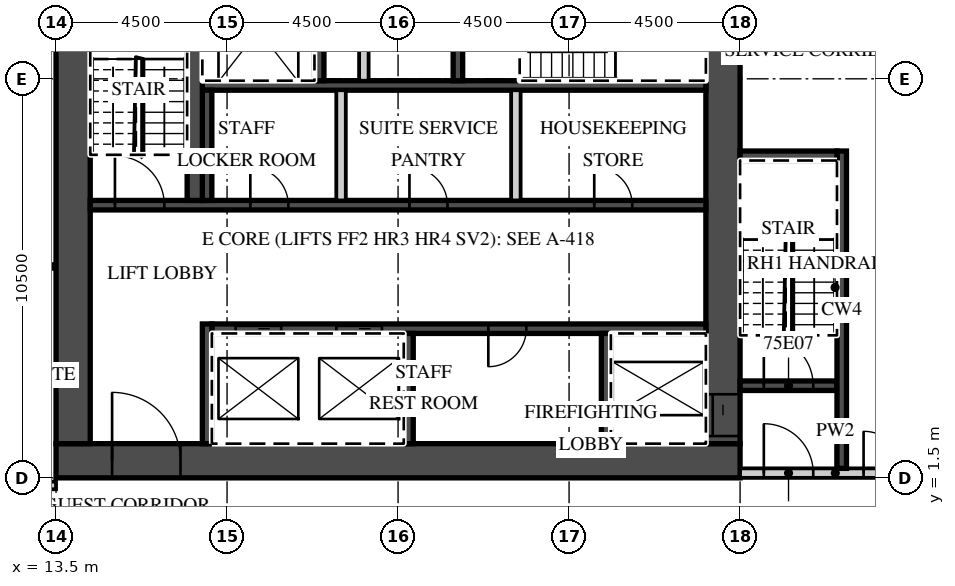
"""IFC4 building model, lengths in metres.
Left out: names, types, materials, properties, quantities, classifications, styles, units other than length and angle.
Written with IfcOpenShell. Run it as: python <this file> out.ifc"""

import sys

from ifc_helpers import new_model, si_unit, direction, frame, frame_2d, origin, place, context, subcontext, project, spatial, rectangle, extrude, element, fill, save


model = new_model("IFC4")
c1 = context("Model", 3, precision=1e-05, world=origin(), true_north=direction((0.0, 1.0)))
c2 = subcontext(c1, "Body", "Model", "MODEL_VIEW")
j1 = project(units=[si_unit("LENGTHUNIT", "METRE"), si_unit("PLANEANGLEUNIT", "RADIAN")], contexts=[c1])
p1 = place(None, origin())
s1 = spatial("IfcSite", under=j1, at=p1, CompositionType="ELEMENT")
p2 = place(p1, origin())
s2 = spatial("IfcBuilding", under=s1, at=p2, CompositionType="ELEMENT")
p3 = place(p2, frame((0.0, 0.0, 298.2)))
s3 = spatial("IfcBuildingStorey", under=s2, at=p3, CompositionType="ELEMENT", Elevation=298.2)
p4 = place(p3, frame((38.132, -12.858, 0.0), z_axis=(0.0, 0.0, 1.0), x_axis=(-0.095847749461, 0.995396006082, 0.0)))
e1 = element("IfcWall", 1, at=p4, inside=s3, PredefinedType="SOLIDWALL", context=c2, shape_type="SweptSolid", body=[
    extrude(rectangle(XDim=32.0, YDim=0.45, at=frame_2d((16.0, 0.0))), origin(), (0.0, 0.0, 1.0), 3.02),
])
p5 = place(p3, frame((-39.909, 1.3, 0.0), z_axis=(0.0, 0.0, 1.0), x_axis=(1.0, 0.0, 0.0)))
e2 = element("IfcWall", 2, at=p5, inside=s3, PredefinedType="PARTITIONING", context=c2, shape_type="SweptSolid", body=[
    extrude(rectangle(XDim=53.409, YDim=0.2, at=frame_2d((26.705, 0.0))), origin(), (0.0, 0.0, 1.0), 3.02),
])
p6 = place(p5, frame((0.255, 0.0, 0.0)))
e3 = element("IfcOpeningElement", 3, at=p6, cuts=e2, PredefinedType="OPENING", context=c2, shape_type="SweptSolid", body=[
    extrude(rectangle(XDim=0.9, YDim=2.1, at=frame_2d((0.45, 1.05))), frame((0.0, 0.11, 0.0), z_axis=(0.0, -1.0, 0.0), x_axis=(1.0, 0.0, 0.0)), (0.0, 0.0, 1.0), 0.22),
])
p7 = place(p5, frame((4.484, 0.0, 0.0)))
e4 = element("IfcOpeningElement", 4, at=p7, cuts=e2, PredefinedType="OPENING", context=c2, shape_type="SweptSolid", body=[
    extrude(rectangle(XDim=1.0, YDim=2.1, at=frame_2d((0.5, 1.05))), frame((0.0, 0.11, 0.0), z_axis=(0.0, -1.0, 0.0), x_axis=(1.0, 0.0, 0.0)), (0.0, 0.0, 1.0), 0.22),
])
p8 = place(p5, frame((11.334, 0.0, 0.0)))
e5 = element("IfcOpeningElement", 5, at=p8, cuts=e2, PredefinedType="OPENING", context=c2, shape_type="SweptSolid", body=[
    extrude(rectangle(XDim=1.0, YDim=2.1, at=frame_2d((0.5, 1.05))), frame((0.0, 0.11, 0.0), z_axis=(0.0, -1.0, 0.0), x_axis=(1.0, 0.0, 0.0)), (0.0, 0.0, 1.0), 0.22),
])
p9 = place(p5, frame((15.347, 0.0, 0.0)))
e6 = element("IfcOpeningElement", 6, at=p9, cuts=e2, PredefinedType="OPENING", context=c2, shape_type="SweptSolid", body=[
    extrude(rectangle(XDim=1.2, YDim=2.1, at=frame_2d((0.6, 1.05))), frame((0.0, 0.11, 0.0), z_axis=(0.0, -1.0, 0.0), x_axis=(1.0, 0.0, 0.0)), (0.0, 0.0, 1.0), 0.22),
])
p10 = place(p5, frame((24.859, 0.0, 0.0)))
e7 = element("IfcOpeningElement", 7, at=p10, cuts=e2, PredefinedType="OPENING", context=c2, shape_type="SweptSolid", body=[
    extrude(rectangle(XDim=1.0, YDim=2.1, at=frame_2d((0.5, 1.05))), frame((0.0, 0.11, 0.0), z_axis=(0.0, -1.0, 0.0), x_axis=(1.0, 0.0, 0.0)), (0.0, 0.0, 1.0), 0.22),
])
p11 = place(p5, frame((26.959, 0.0, 0.0)))
e8 = element("IfcOpeningElement", 8, at=p11, cuts=e2, PredefinedType="OPENING", context=c2, shape_type="SweptSolid", body=[
    extrude(rectangle(XDim=1.0, YDim=2.1, at=frame_2d((0.5, 1.05))), frame((0.0, 0.11, 0.0), z_axis=(0.0, -1.0, 0.0), x_axis=(1.0, 0.0, 0.0)), (0.0, 0.0, 1.0), 0.22),
])
p12 = place(p5, frame((33.346, 0.0, 0.0)))
e9 = element("IfcOpeningElement", 9, at=p12, cuts=e2, PredefinedType="OPENING", context=c2, shape_type="SweptSolid", body=[
    extrude(rectangle(XDim=1.2, YDim=2.1, at=frame_2d((0.6, 1.05))), frame((0.0, 0.11, 0.0), z_axis=(0.0, -1.0, 0.0), x_axis=(1.0, 0.0, 0.0)), (0.0, 0.0, 1.0), 0.22),
])
p13 = place(p5, frame((42.859, 0.0, 0.0)))
e10 = element("IfcOpeningElement", 10, at=p13, cuts=e2, PredefinedType="OPENING", context=c2, shape_type="SweptSolid", body=[
    extrude(rectangle(XDim=1.0, YDim=2.1, at=frame_2d((0.5, 1.05))), frame((0.0, 0.11, 0.0), z_axis=(0.0, -1.0, 0.0), x_axis=(1.0, 0.0, 0.0)), (0.0, 0.0, 1.0), 0.22),
])
p14 = place(p5, frame((44.959, 0.0, 0.0)))
e11 = element("IfcOpeningElement", 11, at=p14, cuts=e2, PredefinedType="OPENING", context=c2, shape_type="SweptSolid", body=[
    extrude(rectangle(XDim=1.0, YDim=2.1, at=frame_2d((0.5, 1.05))), frame((0.0, 0.11, 0.0), z_axis=(0.0, -1.0, 0.0), x_axis=(1.0, 0.0, 0.0)), (0.0, 0.0, 1.0), 0.22),
])
p15 = place(p5, frame((49.484, 0.0, 0.0)))
e12 = element("IfcOpeningElement", 12, at=p15, cuts=e2, PredefinedType="OPENING", context=c2, shape_type="SweptSolid", body=[
    extrude(rectangle(XDim=1.0, YDim=2.1, at=frame_2d((0.5, 1.05))), frame((0.0, 0.11, 0.0), z_axis=(0.0, -1.0, 0.0), x_axis=(1.0, 0.0, 0.0)), (0.0, 0.0, 1.0), 0.22),
])
p16 = place(p3, frame((13.5, 1.95, 0.0), z_axis=(0.0, 0.0, 1.0), x_axis=(1.0, 0.0, 0.0)))
e13 = element("IfcWall", 13, at=p16, inside=s3, PredefinedType="SHEAR", context=c2, shape_type="SweptSolid", body=[
    extrude(rectangle(XDim=18.0, YDim=0.9, at=frame_2d((9.0, 0.0))), origin(), (0.0, 0.0, 1.0), 3.02),
])
p17 = place(p16, frame((1.475, 0.0, 0.0)))
e14 = element("IfcOpeningElement", 14, at=p17, cuts=e13, PredefinedType="OPENING", context=c2, shape_type="SweptSolid", body=[
    extrude(rectangle(XDim=1.8, YDim=2.1, at=frame_2d((0.9, 1.05))), frame((0.0, 0.46, 0.0), z_axis=(0.0, -1.0, 0.0), x_axis=(1.0, 0.0, 0.0)), (0.0, 0.0, 1.0), 0.92),
])
p18 = place(p3, frame((31.05, 2.4, 0.0), z_axis=(0.0, 0.0, 1.0), x_axis=(0.0, 1.0, 0.0)))
e15 = element("IfcWall", 15, at=p18, inside=s3, PredefinedType="SHEAR", context=c2, shape_type="SweptSolid", body=[
    extrude(rectangle(XDim=12.8, YDim=0.9, at=frame_2d((6.4, 0.0))), origin(), (0.0, 0.0, 1.0), 3.02),
])
p19 = place(p18, frame((0.2, 0.0, 0.0)))
e16 = element("IfcOpeningElement", 16, at=p19, cuts=e15, PredefinedType="OPENING", context=c2, shape_type="SweptSolid", body=[
    extrude(rectangle(XDim=1.1, YDim=2.1, at=frame_2d((0.55, 1.05))), frame((0.0, 0.46, 0.0), z_axis=(0.0, -1.0, 0.0), x_axis=(1.0, 0.0, 0.0)), (0.0, 0.0, 1.0), 0.92),
])
p20 = place(p3, frame((13.95, 2.4, 0.0), z_axis=(0.0, 0.0, 1.0), x_axis=(0.0, 1.0, 0.0)))
e17 = element("IfcWall", 17, at=p20, inside=s3, PredefinedType="SHEAR", context=c2, shape_type="SweptSolid", body=[
    extrude(rectangle(XDim=12.2, YDim=0.9, at=frame_2d((6.1, 0.0))), origin(), (0.0, 0.0, 1.0), 3.02),
])
p21 = place(p3, frame((17.6, 5.425, 0.0), z_axis=(0.0, 0.0, 1.0), x_axis=(1.0, 0.0, 0.0)))
e18 = element("IfcWall", 18, at=p21, inside=s3, PredefinedType="SHEAR", context=c2, shape_type="SweptSolid", body=[
    extrude(rectangle(XDim=13.0, YDim=0.25, at=frame_2d((6.5, 0.0))), origin(), (0.0, 0.0, 1.0), 3.02),
])
p22 = place(p21, frame((3.275, 0.0, 0.0)))
e19 = element("IfcOpeningElement", 19, at=p22, cuts=e18, PredefinedType="OPENING", context=c2, shape_type="SweptSolid", body=[
    extrude(rectangle(XDim=1.2, YDim=2.1, at=frame_2d((0.6, 1.05))), frame((0.0, 0.135, 0.0), z_axis=(0.0, -1.0, 0.0), x_axis=(1.0, 0.0, 0.0)), (0.0, 0.0, 1.0), 0.27),
])
p23 = place(p21, frame((0.625, 0.0, 0.0)))
e20 = element("IfcOpeningElement", 20, at=p23, cuts=e18, PredefinedType="OPENING", context=c2, shape_type="SweptSolid", body=[
    extrude(rectangle(XDim=1.2, YDim=2.1, at=frame_2d((0.6, 1.05))), frame((0.0, 0.135, 0.0), z_axis=(0.0, -1.0, 0.0), x_axis=(1.0, 0.0, 0.0)), (0.0, 0.0, 1.0), 0.27),
])
p24 = place(p21, frame((7.275, 0.0, 0.0)))
e21 = element("IfcOpeningElement", 21, at=p24, cuts=e18, PredefinedType="OPENING", context=c2, shape_type="SweptSolid", body=[
    extrude(rectangle(XDim=1.0, YDim=2.1, at=frame_2d((0.5, 1.05))), frame((0.0, 0.135, 0.0), z_axis=(0.0, -1.0, 0.0), x_axis=(1.0, 0.0, 0.0)), (0.0, 0.0, 1.0), 0.27),
])
p25 = place(p3, frame((17.475, 2.4, 0.0), z_axis=(0.0, 0.0, 1.0), x_axis=(0.0, 1.0, 0.0)))
e22 = element("IfcWall", 22, at=p25, inside=s3, PredefinedType="SHEAR", context=c2, shape_type="SweptSolid", body=[
    extrude(rectangle(XDim=3.15, YDim=0.25, at=frame_2d((1.575, 0.0))), origin(), (0.0, 0.0, 1.0), 3.02),
])
for number, where, z_axis, x_axis in (
    (23, (27.975, 2.4, 0.0), (0.0, 0.0, 1.0), (0.0, 1.0, 0.0)),
    (24, (22.775, 2.4, 0.0), (0.0, 0.0, 1.0), (0.0, 1.0, 0.0)),
):
    element("IfcWall", number, at=place(p3, frame(where, z_axis=z_axis, x_axis=x_axis)), inside=s3, PredefinedType="SHEAR", context=c2, shape_type="SweptSolid", body=[
        extrude(rectangle(XDim=2.9, YDim=0.25, at=frame_2d((1.45, 0.0))), origin(), (0.0, 0.0, 1.0), 3.02),
    ])
p26 = place(p3, frame((14.4, 8.675, 0.0), z_axis=(0.0, 0.0, 1.0), x_axis=(1.0, 0.0, 0.0)))
e25 = element("IfcWall", 25, at=p26, inside=s3, PredefinedType="SHEAR", context=c2, shape_type="SweptSolid", body=[
    extrude(rectangle(XDim=16.2, YDim=0.25, at=frame_2d((8.1, 0.0))), origin(), (0.0, 0.0, 1.0), 3.02),
])
p27 = place(p26, frame((0.65, 0.0, 0.0)))
e26 = element("IfcOpeningElement", 26, at=p27, cuts=e25, PredefinedType="OPENING", context=c2, shape_type="SweptSolid", body=[
    extrude(rectangle(XDim=1.3, YDim=2.1, at=frame_2d((0.65, 1.05))), frame((0.0, 0.135, 0.0), z_axis=(0.0, -1.0, 0.0), x_axis=(1.0, 0.0, 0.0)), (0.0, 0.0, 1.0), 0.27),
])
p28 = place(p26, frame((13.262, 0.0, 0.0)))
e27 = element("IfcOpeningElement", 27, at=p28, cuts=e25, PredefinedType="OPENING", context=c2, shape_type="SweptSolid", body=[
    extrude(rectangle(XDim=1.0, YDim=2.1, at=frame_2d((0.5, 1.05))), frame((0.0, 0.135, 0.0), z_axis=(0.0, -1.0, 0.0), x_axis=(1.0, 0.0, 0.0)), (0.0, 0.0, 1.0), 0.27),
])
p29 = place(p26, frame((8.4, 0.0, 0.0)))
e28 = element("IfcOpeningElement", 28, at=p29, cuts=e25, PredefinedType="OPENING", context=c2, shape_type="SweptSolid", body=[
    extrude(rectangle(XDim=1.0, YDim=2.1, at=frame_2d((0.5, 1.05))), frame((0.0, 0.135, 0.0), z_axis=(0.0, -1.0, 0.0), x_axis=(1.0, 0.0, 0.0)), (0.0, 0.0, 1.0), 0.27),
])
p30 = place(p26, frame((4.212, 0.0, 0.0)))
e29 = element("IfcOpeningElement", 29, at=p30, cuts=e25, PredefinedType="OPENING", context=c2, shape_type="SweptSolid", body=[
    extrude(rectangle(XDim=1.0, YDim=2.1, at=frame_2d((0.5, 1.05))), frame((0.0, 0.135, 0.0), z_axis=(0.0, -1.0, 0.0), x_axis=(1.0, 0.0, 0.0)), (0.0, 0.0, 1.0), 0.27),
])
p31 = place(p3, frame((17.35, 11.825, 0.0), z_axis=(0.0, 0.0, 1.0), x_axis=(1.0, 0.0, 0.0)))
e30 = element("IfcWall", 30, at=p31, inside=s3, PredefinedType="SHEAR", context=c2, shape_type="SweptSolid", body=[
    extrude(rectangle(XDim=13.25, YDim=0.25, at=frame_2d((6.625, 0.0))), origin(), (0.0, 0.0, 1.0), 3.02),
])
p32 = place(p3, frame((17.475, 8.8, 0.0), z_axis=(0.0, 0.0, 1.0), x_axis=(0.0, 1.0, 0.0)))
e31 = element("IfcWall", 31, at=p32, inside=s3, PredefinedType="SHEAR", context=c2, shape_type="SweptSolid", body=[
    extrude(rectangle(XDim=2.9, YDim=0.25, at=frame_2d((1.45, 0.0))), origin(), (0.0, 0.0, 1.0), 3.02),
])
for number, where, z_axis, x_axis in (
    (32, (25.6, 8.8, 0.0), (0.0, 0.0, 1.0), (0.0, 1.0, 0.0)),
    (33, (21.0, 8.8, 0.0), (0.0, 0.0, 1.0), (0.0, 1.0, 0.0)),
):
    element("IfcWall", number, at=place(p3, frame(where, z_axis=z_axis, x_axis=x_axis)), inside=s3, PredefinedType="PARTITIONING", context=c2, shape_type="SweptSolid", body=[
        extrude(rectangle(XDim=2.9, YDim=0.25, at=frame_2d((1.45, 0.0))), origin(), (0.0, 0.0, 1.0), 3.02),
    ])
p33 = place(p3, frame((17.15, 8.8, 0.0), z_axis=(0.0, 0.0, 1.0), x_axis=(0.0, 1.0, 0.0)))
e34 = element("IfcWall", 34, at=p33, inside=s3, PredefinedType="SHEAR", context=c2, shape_type="SweptSolid", body=[
    extrude(rectangle(XDim=5.8, YDim=0.4, at=frame_2d((2.9, 0.0))), origin(), (0.0, 0.0, 1.0), 3.02),
])
for number, where, z_axis, x_axis in (
    (35, (20.425, 11.95, 0.0), (0.0, 0.0, 1.0), (0.0, 1.0, 0.0)),
    (36, (24.075, 11.95, 0.0), (0.0, 0.0, 1.0), (0.0, 1.0, 0.0)),
):
    element("IfcWall", number, at=place(p3, frame(where, z_axis=z_axis, x_axis=x_axis)), inside=s3, PredefinedType="SHEAR", context=c2, shape_type="SweptSolid", body=[
        extrude(rectangle(XDim=3.25, YDim=0.25, at=frame_2d((1.625, 0.0))), origin(), (0.0, 0.0, 1.0), 3.02),
    ])
p34 = place(p3, frame((21.6, 11.95, 0.0), z_axis=(0.0, 0.0, 1.0), x_axis=(0.0, 1.0, 0.0)))
e37 = element("IfcWall", 37, at=p34, inside=s3, PredefinedType="PARTITIONING", context=c2, shape_type="SweptSolid", body=[
    extrude(rectangle(XDim=3.25, YDim=0.25, at=frame_2d((1.625, 0.0))), origin(), (0.0, 0.0, 1.0), 3.02),
])
p35 = place(p3, frame((31.5, 1.625, 0.0), z_axis=(0.0, 0.0, 1.0), x_axis=(1.0, 0.0, 0.0)))
e38 = element("IfcWall", 38, at=p35, inside=s3, PredefinedType="PARTITIONING", context=c2, shape_type="SweptSolid", body=[
    extrude(rectangle(XDim=5.012, YDim=0.25, at=frame_2d((2.506, 0.0))), origin(), (0.0, 0.0, 1.0), 3.02),
])
p36 = place(p35, frame((0.625, 0.0, 0.0)))
e39 = element("IfcOpeningElement", 39, at=p36, cuts=e38, PredefinedType="OPENING", context=c2, shape_type="SweptSolid", body=[
    extrude(rectangle(XDim=1.3, YDim=2.1, at=frame_2d((0.65, 1.05))), frame((0.0, 0.135, 0.0), z_axis=(0.0, -1.0, 0.0), x_axis=(1.0, 0.0, 0.0)), (0.0, 0.0, 1.0), 0.27),
])
p37 = place(p35, frame((3.25, 0.0, 0.0)))
e40 = element("IfcOpeningElement", 40, at=p37, cuts=e38, PredefinedType="OPENING", context=c2, shape_type="SweptSolid", body=[
    extrude(rectangle(XDim=1.1, YDim=2.1, at=frame_2d((0.55, 1.05))), frame((0.0, 0.135, 0.0), z_axis=(0.0, -1.0, 0.0), x_axis=(1.0, 0.0, 0.0)), (0.0, 0.0, 1.0), 0.27),
])
p38 = place(p3, frame((31.5, 3.925, 0.0), z_axis=(0.0, 0.0, 1.0), x_axis=(1.0, 0.0, 0.0)))
e41 = element("IfcWall", 41, at=p38, inside=s3, PredefinedType="SHEAR", context=c2, shape_type="SweptSolid", body=[
    extrude(rectangle(XDim=2.55, YDim=0.25, at=frame_2d((1.275, 0.0))), origin(), (0.0, 0.0, 1.0), 3.02),
])
p39 = place(p38, frame((0.625, 0.0, 0.0)))
e42 = element("IfcOpeningElement", 42, at=p39, cuts=e41, PredefinedType="OPENING", context=c2, shape_type="SweptSolid", body=[
    extrude(rectangle(XDim=1.3, YDim=2.1, at=frame_2d((0.65, 1.05))), frame((0.0, 0.135, 0.0), z_axis=(0.0, -1.0, 0.0), x_axis=(1.0, 0.0, 0.0)), (0.0, 0.0, 1.0), 0.27),
])
p40 = place(p3, frame((34.175, 1.75, 0.0), z_axis=(0.0, 0.0, 1.0), x_axis=(0.0, 1.0, 0.0)))
e43 = element("IfcWall", 43, at=p40, inside=s3, PredefinedType="SHEAR", context=c2, shape_type="SweptSolid", body=[
    extrude(rectangle(XDim=8.35, YDim=0.25, at=frame_2d((4.175, 0.0))), origin(), (0.0, 0.0, 1.0), 3.02),
])
p41 = place(p3, frame((31.5, 9.975, 0.0), z_axis=(0.0, 0.0, 1.0), x_axis=(1.0, 0.0, 0.0)))
e44 = element("IfcWall", 44, at=p41, inside=s3, PredefinedType="SHEAR", context=c2, shape_type="SweptSolid", body=[
    extrude(rectangle(XDim=2.55, YDim=0.25, at=frame_2d((1.275, 0.0))), origin(), (0.0, 0.0, 1.0), 3.02),
])
p42 = place(p22, origin())
e45 = element("IfcDoor", 45, at=p42, inside=s3, OperationType="SLIDING_TO_RIGHT", PredefinedType="DOOR", context=c2, shape_type="SweptSolid", body=[
    extrude(rectangle(XDim=1.2, YDim=2.1, at=frame_2d((0.6, 1.05))), frame((0.0, 0.025, 0.0), z_axis=(0.0, -1.0, 0.0), x_axis=(1.0, 0.0, 0.0)), (0.0, 0.0, 1.0), 0.05),
])
fill(e19, e45)
p43 = place(p23, origin())
e46 = element("IfcDoor", 46, at=p43, inside=s3, OperationType="SLIDING_TO_LEFT", PredefinedType="DOOR", context=c2, shape_type="SweptSolid", body=[
    extrude(rectangle(XDim=1.2, YDim=2.1, at=frame_2d((0.6, 1.05))), frame((0.0, 0.025, 0.0), z_axis=(0.0, -1.0, 0.0), x_axis=(1.0, 0.0, 0.0)), (0.0, 0.0, 1.0), 0.05),
])
fill(e20, e46)
p44 = place(p19, origin())
e47 = element("IfcDoor", 47, at=p44, inside=s3, OperationType="SLIDING_TO_LEFT", PredefinedType="DOOR", context=c2, shape_type="SweptSolid", body=[
    extrude(rectangle(XDim=1.1, YDim=2.1, at=frame_2d((0.55, 1.05))), frame((0.0, 0.025, 0.0), z_axis=(0.0, -1.0, 0.0), x_axis=(1.0, 0.0, 0.0)), (0.0, 0.0, 1.0), 0.05),
])
fill(e16, e47)
p45 = place(p17, origin())
e48 = element("IfcDoor", 48, at=p45, inside=s3, OperationType="DOUBLE_DOOR_DOUBLE_SWING", PredefinedType="DOOR", context=c2, shape_type="SweptSolid", body=[
    extrude(rectangle(XDim=1.8, YDim=2.1, at=frame_2d((0.9, 1.05))), frame((0.0, 0.025, 0.0), z_axis=(0.0, -1.0, 0.0), x_axis=(1.0, 0.0, 0.0)), (0.0, 0.0, 1.0), 0.05),
])
fill(e14, e48)
p46 = place(p36, origin())
e49 = element("IfcDoor", 49, at=p46, inside=s3, OperationType="SINGLE_SWING_LEFT", PredefinedType="DOOR", context=c2, shape_type="SweptSolid", body=[
    extrude(rectangle(XDim=1.3, YDim=2.1, at=frame_2d((0.65, 1.05))), frame((0.0, 0.025, 0.0), z_axis=(0.0, -1.0, 0.0), x_axis=(1.0, 0.0, 0.0)), (0.0, 0.0, 1.0), 0.05),
])
fill(e39, e49)
p47 = place(p39, origin())
e50 = element("IfcDoor", 50, at=p47, inside=s3, OperationType="SINGLE_SWING_LEFT", PredefinedType="DOOR", context=c2, shape_type="SweptSolid", body=[
    extrude(rectangle(XDim=1.3, YDim=2.1, at=frame_2d((0.65, 1.05))), frame((0.0, 0.025, 0.0), z_axis=(0.0, -1.0, 0.0), x_axis=(1.0, 0.0, 0.0)), (0.0, 0.0, 1.0), 0.05),
])
fill(e42, e50)
p48 = place(p37, origin())
e51 = element("IfcDoor", 51, at=p48, inside=s3, OperationType="SINGLE_SWING_LEFT", PredefinedType="DOOR", context=c2, shape_type="SweptSolid", body=[
    extrude(rectangle(XDim=1.1, YDim=2.1, at=frame_2d((0.55, 1.05))), frame((0.0, 0.025, 0.0), z_axis=(0.0, -1.0, 0.0), x_axis=(1.0, 0.0, 0.0)), (0.0, 0.0, 1.0), 0.05),
])
fill(e40, e51)
p49 = place(p27, origin())
e52 = element("IfcDoor", 52, at=p49, inside=s3, OperationType="SINGLE_SWING_LEFT", PredefinedType="DOOR", context=c2, shape_type="SweptSolid", body=[
    extrude(rectangle(XDim=1.3, YDim=2.1, at=frame_2d((0.65, 1.05))), frame((0.0, 0.025, 0.0), z_axis=(0.0, -1.0, 0.0), x_axis=(1.0, 0.0, 0.0)), (0.0, 0.0, 1.0), 0.05),
])
fill(e26, e52)
p50 = place(p28, origin())
e53 = element("IfcDoor", 53, at=p50, inside=s3, OperationType="SINGLE_SWING_LEFT", PredefinedType="DOOR", context=c2, shape_type="SweptSolid", body=[
    extrude(rectangle(XDim=1.0, YDim=2.1, at=frame_2d((0.5, 1.05))), frame((0.0, 0.025, 0.0), z_axis=(0.0, -1.0, 0.0), x_axis=(1.0, 0.0, 0.0)), (0.0, 0.0, 1.0), 0.05),
])
fill(e27, e53)
p51 = place(p29, origin())
e54 = element("IfcDoor", 54, at=p51, inside=s3, OperationType="SINGLE_SWING_LEFT", PredefinedType="DOOR", context=c2, shape_type="SweptSolid", body=[
    extrude(rectangle(XDim=1.0, YDim=2.1, at=frame_2d((0.5, 1.05))), frame((0.0, 0.025, 0.0), z_axis=(0.0, -1.0, 0.0), x_axis=(1.0, 0.0, 0.0)), (0.0, 0.0, 1.0), 0.05),
])
fill(e28, e54)
p52 = place(p30, origin())
e55 = element("IfcDoor", 55, at=p52, inside=s3, OperationType="SINGLE_SWING_LEFT", PredefinedType="DOOR", context=c2, shape_type="SweptSolid", body=[
    extrude(rectangle(XDim=1.0, YDim=2.1, at=frame_2d((0.5, 1.05))), frame((0.0, 0.025, 0.0), z_axis=(0.0, -1.0, 0.0), x_axis=(1.0, 0.0, 0.0)), (0.0, 0.0, 1.0), 0.05),
])
fill(e29, e55)
p53 = place(p24, origin())
e56 = element("IfcDoor", 56, at=p53, inside=s3, OperationType="SINGLE_SWING_LEFT", PredefinedType="DOOR", context=c2, shape_type="SweptSolid", body=[
    extrude(rectangle(XDim=1.0, YDim=2.1, at=frame_2d((0.5, 1.05))), frame((0.0, 0.025, 0.0), z_axis=(0.0, -1.0, 0.0), x_axis=(1.0, 0.0, 0.0)), (0.0, 0.0, 1.0), 0.05),
])
fill(e21, e56)
save(model, sys.argv[1])
